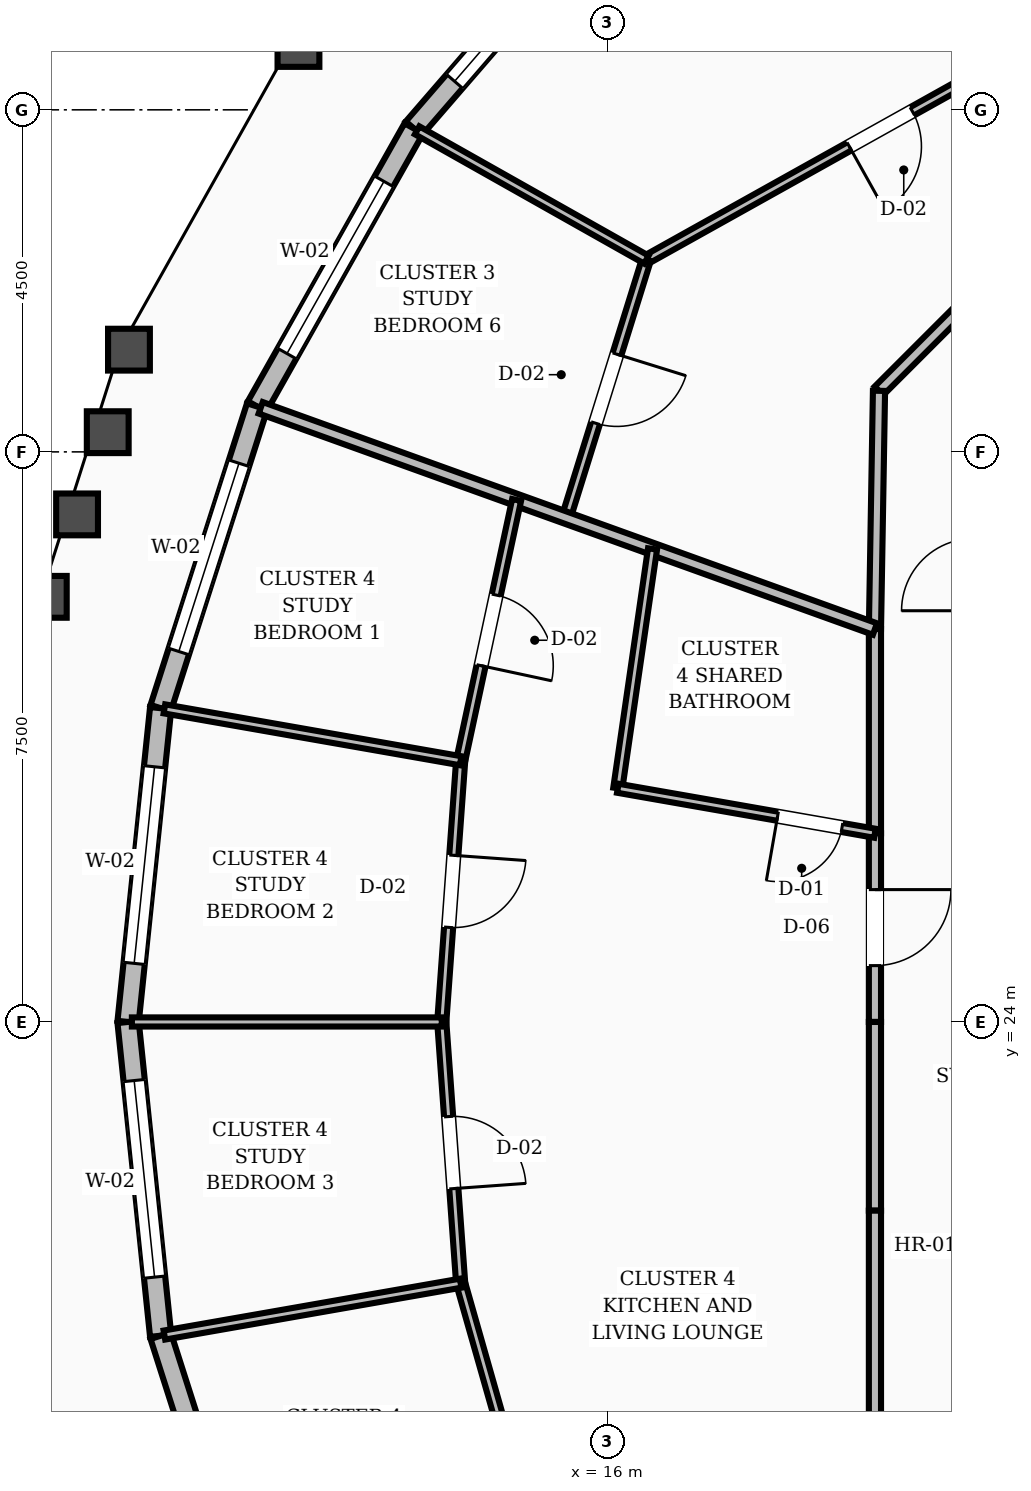
"""IFC4 building model, lengths in metres.
Left out: names, types, materials, properties, quantities, classifications, styles, units other than length and angle.
Written with IfcOpenShell. Run it as: python <this file> out.ifc"""

import sys

from ifc_helpers import new_model, si_unit, direction, frame, frame_2d, origin, place, context, subcontext, project, spatial, rectangle, extrude, element, fill, save


model = new_model("IFC4")
c1 = context("Model", 3, precision=1e-05, world=origin(), true_north=direction((0.0, 1.0)))
c2 = subcontext(c1, "Body", "Model", "MODEL_VIEW")
j1 = project(units=[si_unit("LENGTHUNIT", "METRE"), si_unit("PLANEANGLEUNIT", "RADIAN")], contexts=[c1])
p1 = place(None, origin())
s1 = spatial("IfcSite", under=j1, at=p1, CompositionType="ELEMENT")
p2 = place(p1, origin())
s2 = spatial("IfcBuilding", under=s1, at=p2, CompositionType="ELEMENT")
p3 = place(p2, frame((0.0, 0.0, 232.8)))
s3 = spatial("IfcBuildingStorey", under=s2, at=p3, CompositionType="ELEMENT", Elevation=232.8)
p4 = place(p3, frame((16.227, 38.961, 0.0), z_axis=(0.0, 0.0, 1.0), x_axis=(-0.654274793638, -0.756256897099, 0.0)))
e1 = element("IfcWall", 1, at=p4, inside=s3, PredefinedType="STANDARD", context=c2, shape_type="SweptSolid", body=[
    extrude(rectangle(XDim=4.24, YDim=0.28, at=frame_2d((2.12, 0.0))), origin(), (0.0, 0.0, 1.0), 2.88),
])
p5 = place(p4, frame((0.82, 0.0, 0.8)))
e2 = element("IfcOpeningElement", 2, at=p5, cuts=e1, PredefinedType="OPENING", context=c2, shape_type="SweptSolid", body=[
    extrude(rectangle(XDim=2.6, YDim=1.65, at=frame_2d((1.3, 0.825))), frame((0.0, 0.15, 0.0), z_axis=(0.0, -1.0, 0.0), x_axis=(1.0, 0.0, 0.0)), (0.0, 0.0, 1.0), 0.3),
])
p6 = place(p3, frame((13.453, 35.755, 0.0), z_axis=(0.0, 0.0, 1.0), x_axis=(-0.490926410902, -0.871201044007, 0.0)))
e3 = element("IfcWall", 3, at=p6, inside=s3, PredefinedType="STANDARD", context=c2, shape_type="SweptSolid", body=[
    extrude(rectangle(XDim=4.199, YDim=0.28, at=frame_2d((2.099, 0.0))), origin(), (0.0, 0.0, 1.0), 2.88),
])
p7 = place(p6, frame((0.799, 0.0, 0.8)))
e4 = element("IfcOpeningElement", 4, at=p7, cuts=e3, PredefinedType="OPENING", context=c2, shape_type="SweptSolid", body=[
    extrude(rectangle(XDim=2.6, YDim=1.65, at=frame_2d((1.3, 0.825))), frame((0.0, 0.15, 0.0), z_axis=(0.0, -1.0, 0.0), x_axis=(1.0, 0.0, 0.0)), (0.0, 0.0, 1.0), 0.3),
])
p8 = place(p3, frame((11.392, 32.097, 0.0), z_axis=(0.0, 0.0, 1.0), x_axis=(-0.30458652957, -0.952484669695, 0.0)))
e5 = element("IfcWall", 5, at=p8, inside=s3, PredefinedType="STANDARD", context=c2, shape_type="SweptSolid", body=[
    extrude(rectangle(XDim=4.167, YDim=0.28, at=frame_2d((2.083, 0.0))), origin(), (0.0, 0.0, 1.0), 2.88),
])
p9 = place(p8, frame((0.784, 0.0, 0.8)))
e6 = element("IfcOpeningElement", 6, at=p9, cuts=e5, PredefinedType="OPENING", context=c2, shape_type="SweptSolid", body=[
    extrude(rectangle(XDim=2.6, YDim=1.65, at=frame_2d((1.3, 0.825))), frame((0.0, 0.15, 0.0), z_axis=(0.0, -1.0, 0.0), x_axis=(1.0, 0.0, 0.0)), (0.0, 0.0, 1.0), 0.3),
])
p10 = place(p3, frame((10.123, 28.128, 0.0), z_axis=(0.0, 0.0, 1.0), x_axis=(-0.103306596515, -0.994649559954, 0.0)))
e7 = element("IfcWall", 7, at=p10, inside=s3, PredefinedType="STANDARD", context=c2, shape_type="SweptSolid", body=[
    extrude(rectangle(XDim=4.15, YDim=0.28, at=frame_2d((2.075, 0.0))), origin(), (0.0, 0.0, 1.0), 2.88),
])
p11 = place(p10, frame((0.775, 0.0, 0.8)))
e8 = element("IfcOpeningElement", 8, at=p11, cuts=e7, PredefinedType="OPENING", context=c2, shape_type="SweptSolid", body=[
    extrude(rectangle(XDim=2.6, YDim=1.65, at=frame_2d((1.3, 0.825))), frame((0.0, 0.15, 0.0), z_axis=(0.0, -1.0, 0.0), x_axis=(1.0, 0.0, 0.0)), (0.0, 0.0, 1.0), 0.3),
])
p12 = place(p3, frame((9.694, 24.0, 0.0), z_axis=(0.0, 0.0, 1.0), x_axis=(0.103306596515, -0.994649559954, 0.0)))
e9 = element("IfcWall", 9, at=p12, inside=s3, PredefinedType="STANDARD", context=c2, shape_type="SweptSolid", body=[
    extrude(rectangle(XDim=4.15, YDim=0.28, at=frame_2d((2.075, 0.0))), origin(), (0.0, 0.0, 1.0), 2.88),
])
p13 = place(p12, frame((0.775, 0.0, 0.8)))
e10 = element("IfcOpeningElement", 10, at=p13, cuts=e9, PredefinedType="OPENING", context=c2, shape_type="SweptSolid", body=[
    extrude(rectangle(XDim=2.6, YDim=1.65, at=frame_2d((1.3, 0.825))), frame((0.0, 0.15, 0.0), z_axis=(0.0, -1.0, 0.0), x_axis=(1.0, 0.0, 0.0)), (0.0, 0.0, 1.0), 0.3),
])
p14 = place(p3, frame((10.123, 19.872, 0.0), z_axis=(0.0, 0.0, 1.0), x_axis=(0.30458652957, -0.952484669695, 0.0)))
e11 = element("IfcWall", 11, at=p14, inside=s3, PredefinedType="STANDARD", context=c2, shape_type="SweptSolid", body=[
    extrude(rectangle(XDim=4.167, YDim=0.28, at=frame_2d((2.083, 0.0))), origin(), (0.0, 0.0, 1.0), 2.88),
])
p15 = place(p3, frame((21.635, 34.365, 0.0), z_axis=(0.0, 0.0, 1.0), x_axis=(-0.707106781187, -0.707106781187, 0.0)))
e12 = element("IfcWall", 12, at=p15, inside=s3, PredefinedType="SOLIDWALL", context=c2, shape_type="SweptSolid", body=[
    extrude(rectangle(XDim=2.916, YDim=0.16, at=frame_2d((1.458, 0.0))), origin(), (0.0, 0.0, 1.0), 2.87),
])
p16 = place(p3, frame((19.573, 32.303, 0.0), z_axis=(0.0, 0.0, 1.0), x_axis=(-0.016981035134, -0.999855811828, 0.0)))
e13 = element("IfcWall", 13, at=p16, inside=s3, PredefinedType="SOLIDWALL", context=c2, shape_type="SweptSolid", body=[
    extrude(rectangle(XDim=3.134, YDim=0.16, at=frame_2d((1.567, 0.0))), origin(), (0.0, 0.0, 1.0), 2.87),
])
p17 = place(p3, frame((19.52, 29.169, 0.0), z_axis=(0.0, 0.0, 1.0), x_axis=(0.0, -1.0, 0.0)))
e14 = element("IfcWall", 14, at=p17, inside=s3, PredefinedType="SOLIDWALL", context=c2, shape_type="SweptSolid", body=[
    extrude(rectangle(XDim=2.687, YDim=0.16, at=frame_2d((1.344, 0.0))), origin(), (0.0, 0.0, 1.0), 2.87),
])
p18 = place(p3, frame((19.52, 26.482, 0.0), z_axis=(0.0, 0.0, 1.0), x_axis=(0.0, -1.0, 0.0)))
e15 = element("IfcWall", 15, at=p18, inside=s3, PredefinedType="SOLIDWALL", context=c2, shape_type="SweptSolid", body=[
    extrude(rectangle(XDim=2.482, YDim=0.16, at=frame_2d((1.241, 0.0))), origin(), (0.0, 0.0, 1.0), 2.87),
])
p19 = place(p18, frame((0.741, 0.0, 0.0)))
e16 = element("IfcOpeningElement", 16, at=p19, cuts=e15, PredefinedType="OPENING", context=c2, shape_type="SweptSolid", body=[
    extrude(rectangle(XDim=1.0, YDim=2.1, at=frame_2d((0.5, 1.05))), frame((0.0, 0.09, 0.0), z_axis=(0.0, -1.0, 0.0), x_axis=(1.0, 0.0, 0.0)), (0.0, 0.0, 1.0), 0.18),
])
p20 = place(p3, frame((19.52, 24.0, 0.0), z_axis=(0.0, 0.0, 1.0), x_axis=(0.0, -1.0, 0.0)))
e17 = element("IfcWall", 17, at=p20, inside=s3, PredefinedType="SOLIDWALL", context=c2, shape_type="SweptSolid", body=[
    extrude(rectangle(XDim=2.482, YDim=0.16, at=frame_2d((1.241, 0.0))), origin(), (0.0, 0.0, 1.0), 2.87),
])
p21 = place(p3, frame((19.52, 21.518, 0.0), z_axis=(0.0, 0.0, 1.0), x_axis=(0.0, -1.0, 0.0)))
e18 = element("IfcWall", 18, at=p21, inside=s3, PredefinedType="SOLIDWALL", context=c2, shape_type="SweptSolid", body=[
    extrude(rectangle(XDim=2.687, YDim=0.16, at=frame_2d((1.344, 0.0))), origin(), (0.0, 0.0, 1.0), 2.87),
])
p22 = place(p3, frame((22.68, 37.471, 0.0), z_axis=(0.0, 0.0, 1.0), x_axis=(-0.873183674394, -0.487391291234, 0.0)))
e19 = element("IfcWall", 19, at=p22, inside=s3, PredefinedType="PARTITIONING", context=c2, shape_type="SweptSolid", body=[
    extrude(rectangle(XDim=7.062, YDim=0.12, at=frame_2d((3.531, 0.0))), origin(), (0.0, 0.0, 1.0), 2.87),
])
p23 = place(p22, frame((3.056, 0.0, 0.0)))
e20 = element("IfcOpeningElement", 20, at=p23, cuts=e19, PredefinedType="OPENING", context=c2, shape_type="SweptSolid", body=[
    extrude(rectangle(XDim=0.95, YDim=2.1, at=frame_2d((0.475, 1.05))), frame((0.0, 0.07, 0.0), z_axis=(0.0, -1.0, 0.0), x_axis=(1.0, 0.0, 0.0)), (0.0, 0.0, 1.0), 0.14),
])
p24 = place(p3, frame((16.513, 34.029, 0.0), z_axis=(0.0, 0.0, 1.0), x_axis=(-0.297239013816, -0.954803104658, 0.0)))
e21 = element("IfcWall", 21, at=p24, inside=s3, PredefinedType="PARTITIONING", context=c2, shape_type="SweptSolid", body=[
    extrude(rectangle(XDim=3.556, YDim=0.12, at=frame_2d((1.778, 0.0))), origin(), (0.0, 0.0, 1.0), 2.87),
])
p25 = place(p24, frame((1.303, 0.0, 0.0)))
e22 = element("IfcOpeningElement", 22, at=p25, cuts=e21, PredefinedType="OPENING", context=c2, shape_type="SweptSolid", body=[
    extrude(rectangle(XDim=0.95, YDim=2.1, at=frame_2d((0.475, 1.05))), frame((0.0, 0.07, 0.0), z_axis=(0.0, -1.0, 0.0), x_axis=(1.0, 0.0, 0.0)), (0.0, 0.0, 1.0), 0.14),
])
p26 = place(p3, frame((16.513, 34.029, 0.0), z_axis=(0.0, 0.0, 1.0), x_axis=(-0.87102333073, 0.491241648606, 0.0)))
e23 = element("IfcWall", 23, at=p26, inside=s3, PredefinedType="PARTITIONING", context=c2, shape_type="SweptSolid", body=[
    extrude(rectangle(XDim=3.463, YDim=0.12, at=frame_2d((1.731, 0.0))), origin(), (0.0, 0.0, 1.0), 2.87),
])
p27 = place(p3, frame((19.52, 29.169, 0.0), z_axis=(0.0, 0.0, 1.0), x_axis=(-0.940833047992, 0.338870441032, 0.0)))
e24 = element("IfcWall", 24, at=p27, inside=s3, PredefinedType="SOLIDWALL", context=c2, shape_type="SweptSolid", body=[
    extrude(rectangle(XDim=8.589, YDim=0.16, at=frame_2d((4.295, 0.0))), origin(), (0.0, 0.0, 1.0), 2.87),
])
p28 = place(p3, frame((16.594, 30.223, 0.0), z_axis=(0.0, 0.0, 1.0), x_axis=(-0.14364473036, -0.98962932022, 0.0)))
e25 = element("IfcWall", 25, at=p28, inside=s3, PredefinedType="PARTITIONING", context=c2, shape_type="SweptSolid", body=[
    extrude(rectangle(XDim=3.182, YDim=0.12, at=frame_2d((1.591, 0.0))), origin(), (0.0, 0.0, 1.0), 2.87),
])
p29 = place(p3, frame((19.52, 26.482, 0.0), z_axis=(0.0, 0.0, 1.0), x_axis=(-0.985018092724, 0.172451027852, 0.0)))
e26 = element("IfcWall", 26, at=p29, inside=s3, PredefinedType="PARTITIONING", context=c2, shape_type="SweptSolid", body=[
    extrude(rectangle(XDim=3.435, YDim=0.12, at=frame_2d((1.717, 0.0))), origin(), (0.0, 0.0, 1.0), 2.87),
])
p30 = place(p29, frame((0.44, 0.0, 0.0)))
e27 = element("IfcOpeningElement", 27, at=p30, cuts=e26, PredefinedType="OPENING", context=c2, shape_type="SweptSolid", body=[
    extrude(rectangle(XDim=0.86, YDim=2.1, at=frame_2d((0.43, 1.05))), frame((0.0, 0.07, 0.0), z_axis=(0.0, -1.0, 0.0), x_axis=(1.0, 0.0, 0.0)), (0.0, 0.0, 1.0), 0.14),
])
p31 = place(p3, frame((14.806, 30.867, 0.0), z_axis=(0.0, 0.0, 1.0), x_axis=(-0.209866475618, -0.977730056003, 0.0)))
e28 = element("IfcWall", 28, at=p31, inside=s3, PredefinedType="PARTITIONING", context=c2, shape_type="SweptSolid", body=[
    extrude(rectangle(XDim=3.509, YDim=0.12, at=frame_2d((1.754, 0.0))), origin(), (0.0, 0.0, 1.0), 2.87),
])
p32 = place(p31, frame((1.279, 0.0, 0.0)))
e29 = element("IfcOpeningElement", 29, at=p32, cuts=e28, PredefinedType="OPENING", context=c2, shape_type="SweptSolid", body=[
    extrude(rectangle(XDim=0.95, YDim=2.1, at=frame_2d((0.475, 1.05))), frame((0.0, 0.07, 0.0), z_axis=(0.0, -1.0, 0.0), x_axis=(1.0, 0.0, 0.0)), (0.0, 0.0, 1.0), 0.14),
])
p33 = place(p3, frame((14.07, 27.437, 0.0), z_axis=(0.0, 0.0, 1.0), x_axis=(-0.072128186897, -0.99739537028, 0.0)))
e30 = element("IfcWall", 30, at=p33, inside=s3, PredefinedType="PARTITIONING", context=c2, shape_type="SweptSolid", body=[
    extrude(rectangle(XDim=3.446, YDim=0.12, at=frame_2d((1.723, 0.0))), origin(), (0.0, 0.0, 1.0), 2.87),
])
p34 = place(p33, frame((1.248, 0.0, 0.0)))
e31 = element("IfcOpeningElement", 31, at=p34, cuts=e30, PredefinedType="OPENING", context=c2, shape_type="SweptSolid", body=[
    extrude(rectangle(XDim=0.95, YDim=2.1, at=frame_2d((0.475, 1.05))), frame((0.0, 0.07, 0.0), z_axis=(0.0, -1.0, 0.0), x_axis=(1.0, 0.0, 0.0)), (0.0, 0.0, 1.0), 0.14),
])
p35 = place(p3, frame((14.07, 27.437, 0.0), z_axis=(0.0, 0.0, 1.0), x_axis=(-0.985016843907, 0.172458160782, 0.0)))
e32 = element("IfcWall", 32, at=p35, inside=s3, PredefinedType="PARTITIONING", context=c2, shape_type="SweptSolid", body=[
    extrude(rectangle(XDim=3.957, YDim=0.12, at=frame_2d((1.979, 0.0))), origin(), (0.0, 0.0, 1.0), 2.87),
])
p36 = place(p3, frame((13.821, 24.0, 0.0), z_axis=(0.0, 0.0, 1.0), x_axis=(0.072128186897, -0.99739537028, 0.0)))
e33 = element("IfcWall", 33, at=p36, inside=s3, PredefinedType="PARTITIONING", context=c2, shape_type="SweptSolid", body=[
    extrude(rectangle(XDim=3.446, YDim=0.12, at=frame_2d((1.723, 0.0))), origin(), (0.0, 0.0, 1.0), 2.87),
])
p37 = place(p36, frame((1.248, 0.0, 0.0)))
e34 = element("IfcOpeningElement", 34, at=p37, cuts=e33, PredefinedType="OPENING", context=c2, shape_type="SweptSolid", body=[
    extrude(rectangle(XDim=0.95, YDim=2.1, at=frame_2d((0.475, 1.05))), frame((0.0, 0.07, 0.0), z_axis=(0.0, -1.0, 0.0), x_axis=(1.0, 0.0, 0.0)), (0.0, 0.0, 1.0), 0.14),
])
p38 = place(p3, frame((13.821, 24.0, 0.0), z_axis=(0.0, 0.0, 1.0), x_axis=(-1.0, 0.0, 0.0)))
e35 = element("IfcWall", 35, at=p38, inside=s3, PredefinedType="PARTITIONING", context=c2, shape_type="SweptSolid", body=[
    extrude(rectangle(XDim=4.077, YDim=0.12, at=frame_2d((2.039, 0.0))), origin(), (0.0, 0.0, 1.0), 2.87),
])
p39 = place(p3, frame((14.07, 20.563, 0.0), z_axis=(0.0, 0.0, 1.0), x_axis=(0.273646270328, -0.961830400193, 0.0)))
e36 = element("IfcWall", 36, at=p39, inside=s3, PredefinedType="PARTITIONING", context=c2, shape_type="SweptSolid", body=[
    extrude(rectangle(XDim=7.141, YDim=0.12, at=frame_2d((3.57, 0.0))), origin(), (0.0, 0.0, 1.0), 2.87),
])
p40 = place(p39, frame((3.095, 0.0, 0.0)))
e37 = element("IfcOpeningElement", 37, at=p40, cuts=e36, PredefinedType="OPENING", context=c2, shape_type="SweptSolid", body=[
    extrude(rectangle(XDim=0.95, YDim=2.1, at=frame_2d((0.475, 1.05))), frame((0.0, 0.07, 0.0), z_axis=(0.0, -1.0, 0.0), x_axis=(1.0, 0.0, 0.0)), (0.0, 0.0, 1.0), 0.14),
])
p41 = place(p3, frame((14.07, 20.563, 0.0), z_axis=(0.0, 0.0, 1.0), x_axis=(-0.985016843907, -0.172458160782, 0.0)))
e38 = element("IfcWall", 38, at=p41, inside=s3, PredefinedType="PARTITIONING", context=c2, shape_type="SweptSolid", body=[
    extrude(rectangle(XDim=3.957, YDim=0.12, at=frame_2d((1.979, 0.0))), origin(), (0.0, 0.0, 1.0), 2.87),
])
p42 = place(p5, origin())
e39 = element("IfcWindow", 39, at=p42, inside=s3, PartitioningType="SINGLE_PANEL", PredefinedType="WINDOW", context=c2, shape_type="SweptSolid", body=[
    extrude(rectangle(XDim=2.6, YDim=1.65, at=frame_2d((1.3, 0.825))), frame((0.0, 0.03, 0.0), z_axis=(0.0, -1.0, 0.0), x_axis=(1.0, 0.0, 0.0)), (0.0, 0.0, 1.0), 0.06),
])
fill(e2, e39)
p43 = place(p7, origin())
e40 = element("IfcWindow", 40, at=p43, inside=s3, PartitioningType="SINGLE_PANEL", PredefinedType="WINDOW", context=c2, shape_type="SweptSolid", body=[
    extrude(rectangle(XDim=2.6, YDim=1.65, at=frame_2d((1.3, 0.825))), frame((0.0, 0.03, 0.0), z_axis=(0.0, -1.0, 0.0), x_axis=(1.0, 0.0, 0.0)), (0.0, 0.0, 1.0), 0.06),
])
fill(e4, e40)
p44 = place(p9, origin())
e41 = element("IfcWindow", 41, at=p44, inside=s3, PartitioningType="SINGLE_PANEL", PredefinedType="WINDOW", context=c2, shape_type="SweptSolid", body=[
    extrude(rectangle(XDim=2.6, YDim=1.65, at=frame_2d((1.3, 0.825))), frame((0.0, 0.03, 0.0), z_axis=(0.0, -1.0, 0.0), x_axis=(1.0, 0.0, 0.0)), (0.0, 0.0, 1.0), 0.06),
])
fill(e6, e41)
p45 = place(p11, origin())
e42 = element("IfcWindow", 42, at=p45, inside=s3, PartitioningType="SINGLE_PANEL", PredefinedType="WINDOW", context=c2, shape_type="SweptSolid", body=[
    extrude(rectangle(XDim=2.6, YDim=1.65, at=frame_2d((1.3, 0.825))), frame((0.0, 0.03, 0.0), z_axis=(0.0, -1.0, 0.0), x_axis=(1.0, 0.0, 0.0)), (0.0, 0.0, 1.0), 0.06),
])
fill(e8, e42)
p46 = place(p13, origin())
e43 = element("IfcWindow", 43, at=p46, inside=s3, PartitioningType="SINGLE_PANEL", PredefinedType="WINDOW", context=c2, shape_type="SweptSolid", body=[
    extrude(rectangle(XDim=2.6, YDim=1.65, at=frame_2d((1.3, 0.825))), frame((0.0, 0.03, 0.0), z_axis=(0.0, -1.0, 0.0), x_axis=(1.0, 0.0, 0.0)), (0.0, 0.0, 1.0), 0.06),
])
fill(e10, e43)
p47 = place(p23, origin())
e44 = element("IfcDoor", 44, at=p47, inside=s3, OperationType="SINGLE_SWING_RIGHT", PredefinedType="DOOR", context=c2, shape_type="SweptSolid", body=[
    extrude(rectangle(XDim=0.95, YDim=2.1, at=frame_2d((0.475, 1.05))), frame((0.0, 0.025, 0.0), z_axis=(0.0, -1.0, 0.0), x_axis=(1.0, 0.0, 0.0)), (0.0, 0.0, 1.0), 0.05),
])
fill(e20, e44)
p48 = place(p25, origin())
e45 = element("IfcDoor", 45, at=p48, inside=s3, OperationType="SINGLE_SWING_LEFT", PredefinedType="DOOR", context=c2, shape_type="SweptSolid", body=[
    extrude(rectangle(XDim=0.95, YDim=2.1, at=frame_2d((0.475, 1.05))), frame((0.0, 0.025, 0.0), z_axis=(0.0, -1.0, 0.0), x_axis=(1.0, 0.0, 0.0)), (0.0, 0.0, 1.0), 0.05),
])
fill(e22, e45)
p49 = place(p30, origin())
e46 = element("IfcDoor", 46, at=p49, inside=s3, OperationType="SINGLE_SWING_RIGHT", PredefinedType="DOOR", context=c2, shape_type="SweptSolid", body=[
    extrude(rectangle(XDim=0.86, YDim=2.1, at=frame_2d((0.43, 1.05))), frame((0.0, 0.025, 0.0), z_axis=(0.0, -1.0, 0.0), x_axis=(1.0, 0.0, 0.0)), (0.0, 0.0, 1.0), 0.05),
])
fill(e27, e46)
p50 = place(p19, origin())
e47 = element("IfcDoor", 47, at=p50, inside=s3, OperationType="SINGLE_SWING_LEFT", PredefinedType="DOOR", context=c2, shape_type="SweptSolid", body=[
    extrude(rectangle(XDim=1.0, YDim=2.1, at=frame_2d((0.5, 1.05))), frame((0.0, 0.025, 0.0), z_axis=(0.0, -1.0, 0.0), x_axis=(1.0, 0.0, 0.0)), (0.0, 0.0, 1.0), 0.05),
])
fill(e16, e47)
p51 = place(p32, origin())
e48 = element("IfcDoor", 48, at=p51, inside=s3, OperationType="SINGLE_SWING_RIGHT", PredefinedType="DOOR", context=c2, shape_type="SweptSolid", body=[
    extrude(rectangle(XDim=0.95, YDim=2.1, at=frame_2d((0.475, 1.05))), frame((0.0, 0.025, 0.0), z_axis=(0.0, -1.0, 0.0), x_axis=(1.0, 0.0, 0.0)), (0.0, 0.0, 1.0), 0.05),
])
fill(e29, e48)
p52 = place(p34, origin())
e49 = element("IfcDoor", 49, at=p52, inside=s3, OperationType="SINGLE_SWING_LEFT", PredefinedType="DOOR", context=c2, shape_type="SweptSolid", body=[
    extrude(rectangle(XDim=0.95, YDim=2.1, at=frame_2d((0.475, 1.05))), frame((0.0, 0.025, 0.0), z_axis=(0.0, -1.0, 0.0), x_axis=(1.0, 0.0, 0.0)), (0.0, 0.0, 1.0), 0.05),
])
fill(e31, e49)
p53 = place(p37, origin())
e50 = element("IfcDoor", 50, at=p53, inside=s3, OperationType="SINGLE_SWING_RIGHT", PredefinedType="DOOR", context=c2, shape_type="SweptSolid", body=[
    extrude(rectangle(XDim=0.95, YDim=2.1, at=frame_2d((0.475, 1.05))), frame((0.0, 0.025, 0.0), z_axis=(0.0, -1.0, 0.0), x_axis=(1.0, 0.0, 0.0)), (0.0, 0.0, 1.0), 0.05),
])
fill(e34, e50)
save(model, sys.argv[1])
